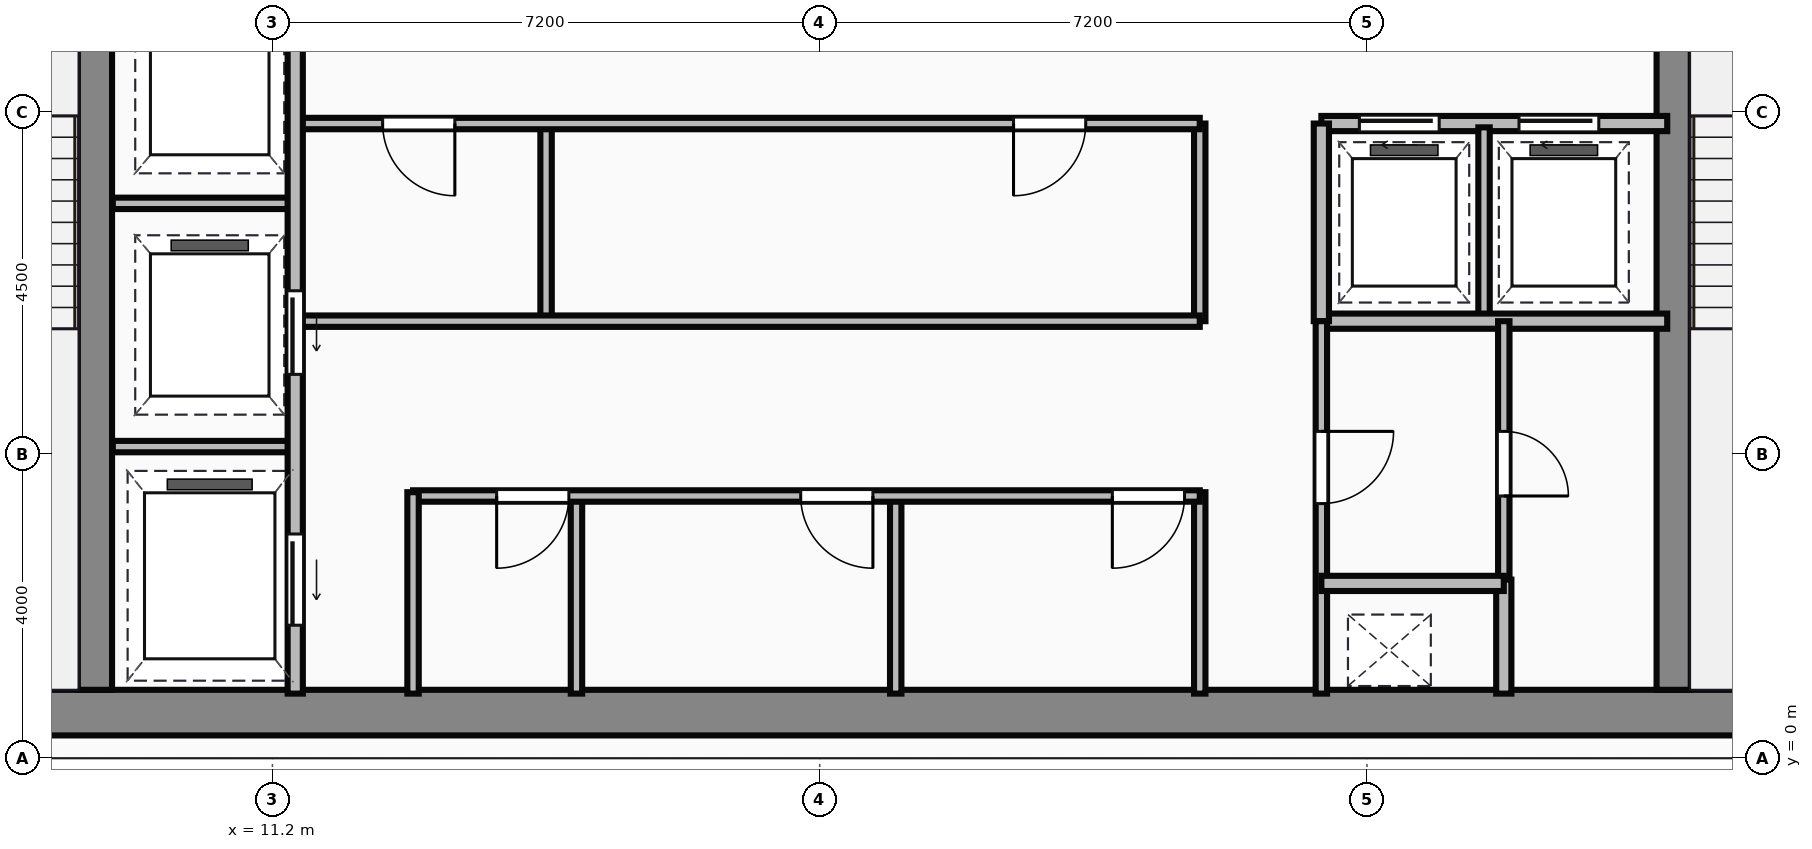
"""IFC4 building model, lengths in metres.
Left out: names, types, materials, properties, quantities, classifications, styles, units other than length and angle.
Written with IfcOpenShell. Run it as: python <this file> out.ifc"""

import sys

from ifc_helpers import new_model, si_unit, direction, frame, frame_2d, origin, place, context, subcontext, project, spatial, rectangle, extrude, source, transform, mapped, element, fill, save


model = new_model("IFC4")
c1 = context("Model", 3, precision=1e-05, world=origin(), true_north=direction((0.0, 1.0)))
c2 = subcontext(c1, "Body", "Model", "MODEL_VIEW")
j1 = project(units=[si_unit("LENGTHUNIT", "METRE"), si_unit("PLANEANGLEUNIT", "RADIAN")], contexts=[c1])
p1 = place(None, origin())
s1 = spatial("IfcSite", under=j1, at=p1, CompositionType="ELEMENT")
p2 = place(p1, origin())
s2 = spatial("IfcBuilding", under=s1, at=p2, CompositionType="ELEMENT")
p3 = place(p2, frame((0.0, 0.0, 284.35)))
s3 = spatial("IfcBuildingStorey", under=s2, at=p3, CompositionType="ELEMENT", Elevation=284.35)
m1 = source(origin(), c2, "Body", "SweptSolid", [
    extrude(rectangle(XDim=29.5, YDim=0.6, at=frame_2d((14.75, 0.0))), origin(), (0.0, 0.0, 1.0), 3.65),
])
p4 = place(p3, frame((4.5, 0.6, 0.0), z_axis=(0.0, 0.0, 1.0), x_axis=(1.0, 0.0, 0.0)))
e1 = element("IfcWall", 1, at=p4, inside=s3, PredefinedType="SHEAR", context=c2, shape_type="MappedRepresentation", body=[
    mapped(m1, transform((0.0, 0.0, 0.0))),
])
m2 = source(origin(), c2, "Body", "SweptSolid", [
    extrude(rectangle(XDim=12.5, YDim=0.45, at=frame_2d((6.25, 0.0))), origin(), (0.0, 0.0, 1.0), 3.65),
])
for number, where, z_axis, x_axis in (
    (2, (8.865, 0.9, 0.0), (0.0, 0.0, 1.0), (0.0, 1.0, 0.0)),
    (3, (29.635, 0.9, 0.0), (0.0, 0.0, 1.0), (0.0, 1.0, 0.0)),
):
    element("IfcWall", number, at=place(p3, frame(where, z_axis=z_axis, x_axis=x_axis)), inside=s3, PredefinedType="SHEAR", context=c2, shape_type="MappedRepresentation", body=[
        mapped(m2, transform((0.0, 0.0, 0.0))),
    ])
m3 = source(origin(), c2, "Body", "SweptSolid", [
    extrude(rectangle(XDim=9.6, YDim=0.2, at=frame_2d((4.8, 0.0))), origin(), (0.0, 0.0, 1.0), 3.4),
])
p5 = place(p3, frame((11.5, 0.85, 0.0), z_axis=(0.0, 0.0, 1.0), x_axis=(0.0, 1.0, 0.0)))
e4 = element("IfcWall", 4, at=p5, inside=s3, PredefinedType="PARTITIONING", context=c2, shape_type="MappedRepresentation", body=[
    mapped(m3, transform((0.0, 0.0, 0.0))),
])
p6 = place(p5, frame((4.2, 0.0, 0.0)))
e5 = element("IfcOpeningElement", 5, at=p6, cuts=e4, PredefinedType="OPENING", context=c2, shape_type="SweptSolid", body=[
    extrude(rectangle(XDim=1.1, YDim=2.15, at=frame_2d((0.55, 1.075))), frame((0.0, 0.11, 0.0), z_axis=(0.0, -1.0, 0.0), x_axis=(1.0, 0.0, 0.0)), (0.0, 0.0, 1.0), 0.22),
])
p7 = place(p5, frame((0.9, 0.0, 0.0)))
e6 = element("IfcOpeningElement", 6, at=p7, cuts=e4, PredefinedType="OPENING", context=c2, shape_type="SweptSolid", body=[
    extrude(rectangle(XDim=1.2, YDim=2.15, at=frame_2d((0.6, 1.075))), frame((0.0, 0.11, 0.0), z_axis=(0.0, -1.0, 0.0), x_axis=(1.0, 0.0, 0.0)), (0.0, 0.0, 1.0), 0.22),
])
m4 = source(origin(), c2, "Body", "SweptSolid", [
    extrude(rectangle(XDim=2.4, YDim=0.15, at=frame_2d((1.2, 0.0))), origin(), (0.0, 0.0, 1.0), 3.4),
])
for number, where, z_axis, x_axis in (
    (7, (9.1, 4.1, 0.0), (0.0, 0.0, 1.0), (1.0, 0.0, 0.0)),
    (8, (9.1, 7.3, 0.0), (0.0, 0.0, 1.0), (1.0, 0.0, 0.0)),
):
    element("IfcWall", number, at=place(p3, frame(where, z_axis=z_axis, x_axis=x_axis)), inside=s3, PredefinedType="PARTITIONING", context=c2, shape_type="MappedRepresentation", body=[
        mapped(m4, transform((0.0, 0.0, 0.0))),
    ])
m5 = source(origin(), c2, "Body", "SweptSolid", [
    extrude(rectangle(XDim=2.65, YDim=0.15, at=frame_2d((1.325, 0.0))), origin(), (0.0, 0.0, 1.0), 3.4),
])
p8 = place(p3, frame((13.05, 0.85, 0.0), z_axis=(0.0, 0.0, 1.0), x_axis=(0.0, 1.0, 0.0)))
e9 = element("IfcWall", 9, at=p8, inside=s3, PredefinedType="PARTITIONING", context=c2, shape_type="MappedRepresentation", body=[
    mapped(m5, transform((0.0, 0.0, 0.0))),
])
m6 = source(origin(), c2, "Body", "SweptSolid", [
    extrude(rectangle(XDim=10.35, YDim=0.15, at=frame_2d((5.175, 0.0))), origin(), (0.0, 0.0, 1.0), 3.4),
])
p9 = place(p3, frame((13.05, 3.45, 0.0), z_axis=(0.0, 0.0, 1.0), x_axis=(1.0, 0.0, 0.0)))
e10 = element("IfcWall", 10, at=p9, inside=s3, PredefinedType="PARTITIONING", context=c2, shape_type="MappedRepresentation", body=[
    mapped(m6, transform((0.0, 0.0, 0.0))),
])
p10 = place(p9, frame((1.1, 0.0, 0.0)))
e11 = element("IfcOpeningElement", 11, at=p10, cuts=e10, PredefinedType="OPENING", context=c2, shape_type="SweptSolid", body=[
    extrude(rectangle(XDim=0.95, YDim=2.15, at=frame_2d((0.475, 1.075))), frame((0.0, 0.085, 0.0), z_axis=(0.0, -1.0, 0.0), x_axis=(1.0, 0.0, 0.0)), (0.0, 0.0, 1.0), 0.17),
])
p11 = place(p9, frame((5.1, 0.0, 0.0)))
e12 = element("IfcOpeningElement", 12, at=p11, cuts=e10, PredefinedType="OPENING", context=c2, shape_type="SweptSolid", body=[
    extrude(rectangle(XDim=0.95, YDim=2.15, at=frame_2d((0.475, 1.075))), frame((0.0, 0.085, 0.0), z_axis=(0.0, -1.0, 0.0), x_axis=(1.0, 0.0, 0.0)), (0.0, 0.0, 1.0), 0.17),
])
p12 = place(p9, frame((9.2, 0.0, 0.0)))
e13 = element("IfcOpeningElement", 13, at=p12, cuts=e10, PredefinedType="OPENING", context=c2, shape_type="SweptSolid", body=[
    extrude(rectangle(XDim=0.95, YDim=2.15, at=frame_2d((0.475, 1.075))), frame((0.0, 0.085, 0.0), z_axis=(0.0, -1.0, 0.0), x_axis=(1.0, 0.0, 0.0)), (0.0, 0.0, 1.0), 0.17),
])
p13 = place(p3, frame((23.4, 0.85, 0.0), z_axis=(0.0, 0.0, 1.0), x_axis=(0.0, 1.0, 0.0)))
e14 = element("IfcWall", 14, at=p13, inside=s3, PredefinedType="PARTITIONING", context=c2, shape_type="MappedRepresentation", body=[
    mapped(m5, transform((0.0, 0.0, 0.0))),
])
m7 = source(origin(), c2, "Body", "SweptSolid", [
    extrude(rectangle(XDim=2.6, YDim=0.15, at=frame_2d((1.3, 0.0))), origin(), (0.0, 0.0, 1.0), 3.4),
])
for number, where, z_axis, x_axis in (
    (15, (15.2, 0.85, 0.0), (0.0, 0.0, 1.0), (0.0, 1.0, 0.0)),
    (16, (19.4, 0.85, 0.0), (0.0, 0.0, 1.0), (0.0, 1.0, 0.0)),
):
    element("IfcWall", number, at=place(p3, frame(where, z_axis=z_axis, x_axis=x_axis)), inside=s3, PredefinedType="PARTITIONING", context=c2, shape_type="MappedRepresentation", body=[
        mapped(m7, transform((0.0, 0.0, 0.0))),
    ])
m8 = source(origin(), c2, "Body", "SweptSolid", [
    extrude(rectangle(XDim=11.85, YDim=0.15, at=frame_2d((5.925, 0.0))), origin(), (0.0, 0.0, 1.0), 3.4),
])
p14 = place(p3, frame((11.55, 5.75, 0.0), z_axis=(0.0, 0.0, 1.0), x_axis=(1.0, 0.0, 0.0)))
e17 = element("IfcWall", 17, at=p14, inside=s3, PredefinedType="PARTITIONING", context=c2, shape_type="MappedRepresentation", body=[
    mapped(m8, transform((0.0, 0.0, 0.0))),
])
p15 = place(p3, frame((11.55, 8.35, 0.0), z_axis=(0.0, 0.0, 1.0), x_axis=(1.0, 0.0, 0.0)))
e18 = element("IfcWall", 18, at=p15, inside=s3, PredefinedType="PARTITIONING", context=c2, shape_type="MappedRepresentation", body=[
    mapped(m8, transform((0.0, 0.0, 0.0))),
])
p16 = place(p15, frame((1.1, 0.0, 0.0)))
e19 = element("IfcOpeningElement", 19, at=p16, cuts=e18, PredefinedType="OPENING", context=c2, shape_type="SweptSolid", body=[
    extrude(rectangle(XDim=0.95, YDim=2.15, at=frame_2d((0.475, 1.075))), frame((0.0, 0.085, 0.0), z_axis=(0.0, -1.0, 0.0), x_axis=(1.0, 0.0, 0.0)), (0.0, 0.0, 1.0), 0.17),
])
p17 = place(p15, frame((9.4, 0.0, 0.0)))
e20 = element("IfcOpeningElement", 20, at=p17, cuts=e18, PredefinedType="OPENING", context=c2, shape_type="SweptSolid", body=[
    extrude(rectangle(XDim=0.95, YDim=2.15, at=frame_2d((0.475, 1.075))), frame((0.0, 0.085, 0.0), z_axis=(0.0, -1.0, 0.0), x_axis=(1.0, 0.0, 0.0)), (0.0, 0.0, 1.0), 0.17),
])
m9 = source(origin(), c2, "Body", "SweptSolid", [
    extrude(rectangle(XDim=2.6, YDim=0.15, at=frame_2d((1.3, 0.0))), origin(), (0.0, 0.0, 1.0), 3.4),
])
p18 = place(p3, frame((23.4, 5.75, 0.0), z_axis=(0.0, 0.0, 1.0), x_axis=(0.0, 1.0, 0.0)))
e21 = element("IfcWall", 21, at=p18, inside=s3, PredefinedType="PARTITIONING", context=c2, shape_type="MappedRepresentation", body=[
    mapped(m9, transform((0.0, 0.0, 0.0))),
])
m10 = source(origin(), c2, "Body", "SweptSolid", [
    extrude(rectangle(XDim=2.5, YDim=0.15, at=frame_2d((1.25, 0.0))), origin(), (0.0, 0.0, 1.0), 3.4),
])
p19 = place(p3, frame((14.8, 5.8, 0.0), z_axis=(0.0, 0.0, 1.0), x_axis=(0.0, 1.0, 0.0)))
e22 = element("IfcWall", 22, at=p19, inside=s3, PredefinedType="PARTITIONING", context=c2, shape_type="MappedRepresentation", body=[
    mapped(m10, transform((0.0, 0.0, 0.0))),
])
m11 = source(origin(), c2, "Body", "SweptSolid", [
    extrude(rectangle(XDim=4.55, YDim=0.2, at=frame_2d((2.275, 0.0))), origin(), (0.0, 0.0, 1.0), 3.4),
])
p20 = place(p3, frame((25.0, 8.35, 0.0), z_axis=(0.0, 0.0, 1.0), x_axis=(1.0, 0.0, 0.0)))
e23 = element("IfcWall", 23, at=p20, inside=s3, PredefinedType="PARTITIONING", context=c2, shape_type="MappedRepresentation", body=[
    mapped(m11, transform((0.0, 0.0, 0.0))),
])
p21 = place(p20, frame((0.5, 0.0, 0.0)))
e24 = element("IfcOpeningElement", 24, at=p21, cuts=e23, PredefinedType="OPENING", context=c2, shape_type="SweptSolid", body=[
    extrude(rectangle(XDim=1.05, YDim=2.15, at=frame_2d((0.525, 1.075))), frame((0.0, 0.11, 0.0), z_axis=(0.0, -1.0, 0.0), x_axis=(1.0, 0.0, 0.0)), (0.0, 0.0, 1.0), 0.22),
])
p22 = place(p20, frame((2.6, 0.0, 0.0)))
e25 = element("IfcOpeningElement", 25, at=p22, cuts=e23, PredefinedType="OPENING", context=c2, shape_type="SweptSolid", body=[
    extrude(rectangle(XDim=1.05, YDim=2.15, at=frame_2d((0.525, 1.075))), frame((0.0, 0.11, 0.0), z_axis=(0.0, -1.0, 0.0), x_axis=(1.0, 0.0, 0.0)), (0.0, 0.0, 1.0), 0.22),
])
p23 = place(p3, frame((25.0, 5.75, 0.0), z_axis=(0.0, 0.0, 1.0), x_axis=(1.0, 0.0, 0.0)))
e26 = element("IfcWall", 26, at=p23, inside=s3, PredefinedType="PARTITIONING", context=c2, shape_type="MappedRepresentation", body=[
    mapped(m11, transform((0.0, 0.0, 0.0))),
])
m12 = source(origin(), c2, "Body", "SweptSolid", [
    extrude(rectangle(XDim=2.6, YDim=0.2, at=frame_2d((1.3, 0.0))), origin(), (0.0, 0.0, 1.0), 3.4),
])
p24 = place(p3, frame((25.0, 5.75, 0.0), z_axis=(0.0, 0.0, 1.0), x_axis=(0.0, 1.0, 0.0)))
e27 = element("IfcWall", 27, at=p24, inside=s3, PredefinedType="PARTITIONING", context=c2, shape_type="MappedRepresentation", body=[
    mapped(m12, transform((0.0, 0.0, 0.0))),
])
p25 = place(p3, frame((27.14, 5.8, 0.0), z_axis=(0.0, 0.0, 1.0), x_axis=(0.0, 1.0, 0.0)))
e28 = element("IfcWall", 28, at=p25, inside=s3, PredefinedType="PARTITIONING", context=c2, shape_type="MappedRepresentation", body=[
    mapped(m10, transform((0.0, 0.0, 0.0))),
])
m13 = source(origin(), c2, "Body", "SweptSolid", [
    extrude(rectangle(XDim=4.9, YDim=0.15, at=frame_2d((2.45, 0.0))), origin(), (0.0, 0.0, 1.0), 3.4),
])
p26 = place(p3, frame((25.0, 0.85, 0.0), z_axis=(0.0, 0.0, 1.0), x_axis=(0.0, 1.0, 0.0)))
e29 = element("IfcWall", 29, at=p26, inside=s3, PredefinedType="PARTITIONING", context=c2, shape_type="MappedRepresentation", body=[
    mapped(m13, transform((0.0, 0.0, 0.0))),
])
p27 = place(p26, frame((2.5, 0.0, 0.0)))
e30 = element("IfcOpeningElement", 30, at=p27, cuts=e29, PredefinedType="OPENING", context=c2, shape_type="SweptSolid", body=[
    extrude(rectangle(XDim=0.95, YDim=2.15, at=frame_2d((0.475, 1.075))), frame((0.0, 0.085, 0.0), z_axis=(0.0, -1.0, 0.0), x_axis=(1.0, 0.0, 0.0)), (0.0, 0.0, 1.0), 0.17),
])
m14 = source(origin(), c2, "Body", "SweptSolid", [
    extrude(rectangle(XDim=2.4, YDim=0.2, at=frame_2d((1.2, 0.0))), origin(), (0.0, 0.0, 1.0), 3.4),
])
p28 = place(p3, frame((25.0, 2.3, 0.0), z_axis=(0.0, 0.0, 1.0), x_axis=(1.0, 0.0, 0.0)))
e31 = element("IfcWall", 31, at=p28, inside=s3, PredefinedType="PARTITIONING", context=c2, shape_type="MappedRepresentation", body=[
    mapped(m14, transform((0.0, 0.0, 0.0))),
])
m15 = source(origin(), c2, "Body", "SweptSolid", [
    extrude(rectangle(XDim=1.5, YDim=0.2, at=frame_2d((0.75, 0.0))), origin(), (0.0, 0.0, 1.0), 3.4),
])
p29 = place(p3, frame((27.4, 0.85, 0.0), z_axis=(0.0, 0.0, 1.0), x_axis=(0.0, 1.0, 0.0)))
e32 = element("IfcWall", 32, at=p29, inside=s3, PredefinedType="PARTITIONING", context=c2, shape_type="MappedRepresentation", body=[
    mapped(m15, transform((0.0, 0.0, 0.0))),
])
m16 = source(origin(), c2, "Body", "SweptSolid", [
    extrude(rectangle(XDim=3.4, YDim=0.15, at=frame_2d((1.7, 0.0))), origin(), (0.0, 0.0, 1.0), 3.4),
])
p30 = place(p3, frame((27.4, 2.35, 0.0), z_axis=(0.0, 0.0, 1.0), x_axis=(0.0, 1.0, 0.0)))
e33 = element("IfcWall", 33, at=p30, inside=s3, PredefinedType="PARTITIONING", context=c2, shape_type="MappedRepresentation", body=[
    mapped(m16, transform((0.0, 0.0, 0.0))),
])
p31 = place(p30, frame((1.1, 0.0, 0.0)))
e34 = element("IfcOpeningElement", 34, at=p31, cuts=e33, PredefinedType="OPENING", context=c2, shape_type="SweptSolid", body=[
    extrude(rectangle(XDim=0.85, YDim=2.1, at=frame_2d((0.425, 1.05))), frame((0.0, 0.085, 0.0), z_axis=(0.0, -1.0, 0.0), x_axis=(1.0, 0.0, 0.0)), (0.0, 0.0, 1.0), 0.17),
])
m17 = source(origin(), c2, "Body", "SweptSolid", [
    extrude(rectangle(XDim=1.1, YDim=2.15, at=frame_2d((0.55, 1.075))), frame((0.0, 0.025, 0.0), z_axis=(0.0, -1.0, 0.0), x_axis=(1.0, 0.0, 0.0)), (0.0, 0.0, 1.0), 0.05),
])
p32 = place(p6, frame((1.1, 0.0, 0.0), z_axis=(0.0, 0.0, 1.0), x_axis=(-1.0, 0.0, 0.0)))
e35 = element("IfcDoor", 35, at=p32, inside=s3, OperationType="SLIDING_TO_LEFT", PredefinedType="DOOR", context=c2, shape_type="MappedRepresentation", body=[
    mapped(m17, transform((0.0, 0.0, 0.0))),
])
fill(e5, e35)
m18 = source(origin(), c2, "Body", "SweptSolid", [
    extrude(rectangle(XDim=1.2, YDim=2.15, at=frame_2d((0.6, 1.075))), frame((0.0, 0.025, 0.0), z_axis=(0.0, -1.0, 0.0), x_axis=(1.0, 0.0, 0.0)), (0.0, 0.0, 1.0), 0.05),
])
p33 = place(p7, frame((1.2, 0.0, 0.0), z_axis=(0.0, 0.0, 1.0), x_axis=(-1.0, 0.0, 0.0)))
e36 = element("IfcDoor", 36, at=p33, inside=s3, OperationType="SLIDING_TO_LEFT", PredefinedType="DOOR", context=c2, shape_type="MappedRepresentation", body=[
    mapped(m18, transform((0.0, 0.0, 0.0))),
])
fill(e6, e36)
m19 = source(origin(), c2, "Body", "SweptSolid", [
    extrude(rectangle(XDim=0.95, YDim=2.15, at=frame_2d((0.475, 1.075))), frame((0.0, 0.025, 0.0), z_axis=(0.0, -1.0, 0.0), x_axis=(1.0, 0.0, 0.0)), (0.0, 0.0, 1.0), 0.05),
])
p34 = place(p10, origin())
e37 = element("IfcDoor", 37, at=p34, inside=s3, OperationType="SINGLE_SWING_LEFT", PredefinedType="DOOR", context=c2, shape_type="MappedRepresentation", body=[
    mapped(m19, transform((0.0, 0.0, 0.0))),
])
fill(e11, e37)
p35 = place(p11, origin())
e38 = element("IfcDoor", 38, at=p35, inside=s3, OperationType="SINGLE_SWING_RIGHT", PredefinedType="DOOR", context=c2, shape_type="MappedRepresentation", body=[
    mapped(m19, transform((0.0, 0.0, 0.0))),
])
fill(e12, e38)
p36 = place(p12, origin())
e39 = element("IfcDoor", 39, at=p36, inside=s3, OperationType="SINGLE_SWING_LEFT", PredefinedType="DOOR", context=c2, shape_type="MappedRepresentation", body=[
    mapped(m19, transform((0.0, 0.0, 0.0))),
])
fill(e13, e39)
p37 = place(p16, origin())
e40 = element("IfcDoor", 40, at=p37, inside=s3, OperationType="SINGLE_SWING_RIGHT", PredefinedType="DOOR", context=c2, shape_type="MappedRepresentation", body=[
    mapped(m19, transform((0.0, 0.0, 0.0))),
])
fill(e19, e40)
p38 = place(p17, origin())
e41 = element("IfcDoor", 41, at=p38, inside=s3, OperationType="SINGLE_SWING_LEFT", PredefinedType="DOOR", context=c2, shape_type="MappedRepresentation", body=[
    mapped(m19, transform((0.0, 0.0, 0.0))),
])
fill(e20, e41)
m20 = source(origin(), c2, "Body", "SweptSolid", [
    extrude(rectangle(XDim=1.05, YDim=2.15, at=frame_2d((0.525, 1.075))), frame((0.0, 0.025, 0.0), z_axis=(0.0, -1.0, 0.0), x_axis=(1.0, 0.0, 0.0)), (0.0, 0.0, 1.0), 0.05),
])
p39 = place(p21, origin())
e42 = element("IfcDoor", 42, at=p39, inside=s3, OperationType="SLIDING_TO_LEFT", PredefinedType="DOOR", context=c2, shape_type="MappedRepresentation", body=[
    mapped(m20, transform((0.0, 0.0, 0.0))),
])
fill(e24, e42)
p40 = place(p22, origin())
e43 = element("IfcDoor", 43, at=p40, inside=s3, OperationType="SLIDING_TO_LEFT", PredefinedType="DOOR", context=c2, shape_type="MappedRepresentation", body=[
    mapped(m20, transform((0.0, 0.0, 0.0))),
])
fill(e25, e43)
p41 = place(p27, origin())
e44 = element("IfcDoor", 44, at=p41, inside=s3, OperationType="SINGLE_SWING_RIGHT", PredefinedType="DOOR", context=c2, shape_type="MappedRepresentation", body=[
    mapped(m19, transform((0.0, 0.0, 0.0))),
])
fill(e30, e44)
m21 = source(origin(), c2, "Body", "SweptSolid", [
    extrude(rectangle(XDim=0.85, YDim=2.1, at=frame_2d((0.425, 1.05))), frame((0.0, 0.025, 0.0), z_axis=(0.0, -1.0, 0.0), x_axis=(1.0, 0.0, 0.0)), (0.0, 0.0, 1.0), 0.05),
])
p42 = place(p31, frame((0.85, 0.0, 0.0), z_axis=(0.0, 0.0, 1.0), x_axis=(-1.0, 0.0, 0.0)))
e45 = element("IfcDoor", 45, at=p42, inside=s3, OperationType="SINGLE_SWING_LEFT", PredefinedType="DOOR", context=c2, shape_type="MappedRepresentation", body=[
    mapped(m21, transform((0.0, 0.0, 0.0))),
])
fill(e34, e45)
save(model, sys.argv[1])
